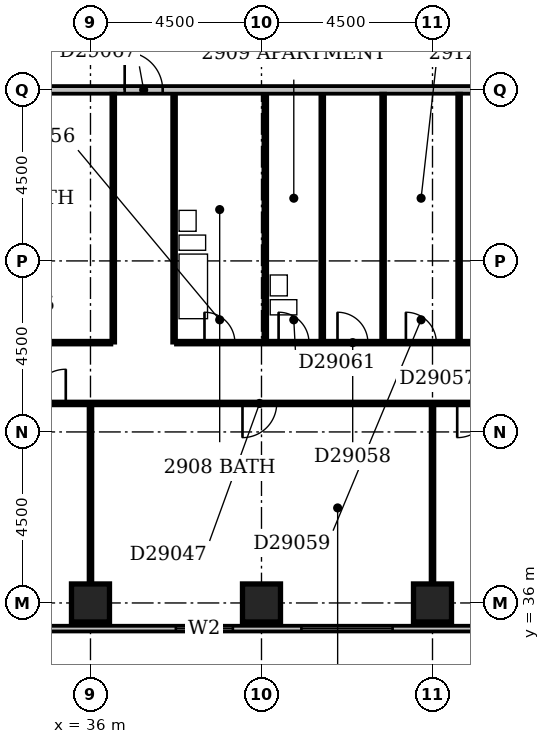
"""IFC4 building model, lengths in metres.
Left out: names, types, materials, properties, quantities, classifications, styles, units other than length and angle.
Written with IfcOpenShell. Run it as: python <this file> out.ifc"""

import sys

from ifc_helpers import new_model, si_unit, direction, frame, frame_2d, origin, origin_2d, place, context, subcontext, project, spatial, rectangle, extrude, element, fill, save


model = new_model("IFC4")
c1 = context("Model", 3, precision=1e-05, world=origin(), true_north=direction((0.0, 1.0)))
c2 = subcontext(c1, "Body", "Model", "MODEL_VIEW")
j1 = project(units=[si_unit("LENGTHUNIT", "METRE"), si_unit("PLANEANGLEUNIT", "RADIAN")], contexts=[c1])
p1 = place(None, origin())
s1 = spatial("IfcSite", under=j1, at=p1, CompositionType="ELEMENT")
p2 = place(p1, origin())
s2 = spatial("IfcBuilding", under=s1, at=p2, CompositionType="ELEMENT")
p3 = place(p2, frame((0.0, 0.0, 119.6)))
s3 = spatial("IfcBuildingStorey", under=s2, at=p3, CompositionType="ELEMENT", Elevation=119.6)
for number, where, z_axis, x_axis in (
    (1, (36.0, 36.0, -0.3), (0.0, 0.0, 1.0), (1.0, 0.0, 0.0)),
    (2, (40.5, 36.0, -0.3), (0.0, 0.0, 1.0), (1.0, 0.0, 0.0)),
    (3, (45.0, 36.0, -0.3), (0.0, 0.0, 1.0), (1.0, 0.0, 0.0)),
):
    element("IfcColumn", number, at=place(p3, frame(where, z_axis=z_axis, x_axis=x_axis)), inside=s3, PredefinedType="COLUMN", context=c2, shape_type="SweptSolid", body=[
        extrude(rectangle(XDim=1.0, YDim=1.0, at=origin_2d()), origin(), (0.0, 0.0, 1.0), 3.6),
    ])
p4 = place(p3, frame((23.1, 35.325, 0.0), z_axis=(0.0, 0.0, 1.0), x_axis=(1.0, 0.0, 0.0)))
e4 = element("IfcWall", 4, at=p4, inside=s3, PredefinedType="STANDARD", context=c2, shape_type="SweptSolid", body=[
    extrude(rectangle(XDim=45.15, YDim=0.15, at=frame_2d((22.575, 0.0))), origin(), (0.0, 0.0, 1.0), 2.7),
])
p5 = place(p4, frame((0.45, 0.0, 0.6)))
e5 = element("IfcOpeningElement", 5, at=p5, cuts=e4, PredefinedType="OPENING", context=c2, shape_type="SweptSolid", body=[
    extrude(rectangle(XDim=2.4, YDim=1.8, at=frame_2d((1.2, 0.9))), frame((0.0, 0.087, 0.0), z_axis=(0.0, -1.0, 0.0), x_axis=(1.0, 0.0, 0.0)), (0.0, 0.0, 1.0), 0.174),
])
p6 = place(p4, frame((4.95, 0.0, 0.6)))
e6 = element("IfcOpeningElement", 6, at=p6, cuts=e4, PredefinedType="OPENING", context=c2, shape_type="SweptSolid", body=[
    extrude(rectangle(XDim=2.4, YDim=1.8, at=frame_2d((1.2, 0.9))), frame((0.0, 0.087, 0.0), z_axis=(0.0, -1.0, 0.0), x_axis=(1.0, 0.0, 0.0)), (0.0, 0.0, 1.0), 0.174),
])
p7 = place(p4, frame((9.225, 0.0, 0.6)))
e7 = element("IfcOpeningElement", 7, at=p7, cuts=e4, PredefinedType="OPENING", context=c2, shape_type="SweptSolid", body=[
    extrude(rectangle(XDim=1.5, YDim=1.8, at=frame_2d((0.75, 0.9))), frame((0.0, 0.087, 0.0), z_axis=(0.0, -1.0, 0.0), x_axis=(1.0, 0.0, 0.0)), (0.0, 0.0, 1.0), 0.174),
])
p8 = place(p4, frame((15.146, 0.0, 0.6)))
e8 = element("IfcOpeningElement", 8, at=p8, cuts=e4, PredefinedType="OPENING", context=c2, shape_type="SweptSolid", body=[
    extrude(rectangle(XDim=1.5, YDim=1.8, at=frame_2d((0.75, 0.9))), frame((0.0, 0.087, 0.0), z_axis=(0.0, -1.0, 0.0), x_axis=(1.0, 0.0, 0.0)), (0.0, 0.0, 1.0), 0.174),
])
p9 = place(p4, frame((18.45, 0.0, 0.6)))
e9 = element("IfcOpeningElement", 9, at=p9, cuts=e4, PredefinedType="OPENING", context=c2, shape_type="SweptSolid", body=[
    extrude(rectangle(XDim=2.4, YDim=1.8, at=frame_2d((1.2, 0.9))), frame((0.0, 0.087, 0.0), z_axis=(0.0, -1.0, 0.0), x_axis=(1.0, 0.0, 0.0)), (0.0, 0.0, 1.0), 0.174),
])
p10 = place(p4, frame((22.95, 0.0, 0.6)))
e10 = element("IfcOpeningElement", 10, at=p10, cuts=e4, PredefinedType="OPENING", context=c2, shape_type="SweptSolid", body=[
    extrude(rectangle(XDim=2.4, YDim=1.8, at=frame_2d((1.2, 0.9))), frame((0.0, 0.087, 0.0), z_axis=(0.0, -1.0, 0.0), x_axis=(1.0, 0.0, 0.0)), (0.0, 0.0, 1.0), 0.174),
])
p11 = place(p4, frame((27.45, 0.0, 0.6)))
e11 = element("IfcOpeningElement", 11, at=p11, cuts=e4, PredefinedType="OPENING", context=c2, shape_type="SweptSolid", body=[
    extrude(rectangle(XDim=2.4, YDim=1.8, at=frame_2d((1.2, 0.9))), frame((0.0, 0.087, 0.0), z_axis=(0.0, -1.0, 0.0), x_axis=(1.0, 0.0, 0.0)), (0.0, 0.0, 1.0), 0.174),
])
p12 = place(p4, frame((31.95, 0.0, 0.6)))
e12 = element("IfcOpeningElement", 12, at=p12, cuts=e4, PredefinedType="OPENING", context=c2, shape_type="SweptSolid", body=[
    extrude(rectangle(XDim=2.4, YDim=1.8, at=frame_2d((1.2, 0.9))), frame((0.0, 0.087, 0.0), z_axis=(0.0, -1.0, 0.0), x_axis=(1.0, 0.0, 0.0)), (0.0, 0.0, 1.0), 0.174),
])
p13 = place(p4, frame((36.45, 0.0, 0.6)))
e13 = element("IfcOpeningElement", 13, at=p13, cuts=e4, PredefinedType="OPENING", context=c2, shape_type="SweptSolid", body=[
    extrude(rectangle(XDim=2.4, YDim=1.8, at=frame_2d((1.2, 0.9))), frame((0.0, 0.087, 0.0), z_axis=(0.0, -1.0, 0.0), x_axis=(1.0, 0.0, 0.0)), (0.0, 0.0, 1.0), 0.174),
])
p14 = place(p4, frame((40.631, 0.0, 0.6)))
e14 = element("IfcOpeningElement", 14, at=p14, cuts=e4, PredefinedType="OPENING", context=c2, shape_type="SweptSolid", body=[
    extrude(rectangle(XDim=0.9, YDim=1.8, at=frame_2d((0.45, 0.9))), frame((0.0, 0.087, 0.0), z_axis=(0.0, -1.0, 0.0), x_axis=(1.0, 0.0, 0.0)), (0.0, 0.0, 1.0), 0.174),
])
p15 = place(p3, frame((36.0, 36.5, 0.0), z_axis=(0.0, 0.0, 1.0), x_axis=(0.0, 1.0, 0.0)))
e15 = element("IfcWall", 15, at=p15, inside=s3, PredefinedType="PARTITIONING", context=c2, shape_type="SweptSolid", body=[
    extrude(rectangle(XDim=4.7, YDim=0.1, at=frame_2d((2.35, 0.0))), origin(), (0.0, 0.0, 1.0), 2.4),
])
p16 = place(p3, frame((45.0, 36.5, 0.0), z_axis=(0.0, 0.0, 1.0), x_axis=(0.0, 1.0, 0.0)))
e16 = element("IfcWall", 16, at=p16, inside=s3, PredefinedType="PARTITIONING", context=c2, shape_type="SweptSolid", body=[
    extrude(rectangle(XDim=4.7, YDim=0.1, at=frame_2d((2.35, 0.0))), origin(), (0.0, 0.0, 1.0), 2.6),
])
p17 = place(p3, frame((31.6, 41.25, 0.0), z_axis=(0.0, 0.0, 1.0), x_axis=(1.0, 0.0, 0.0)))
e17 = element("IfcWall", 17, at=p17, inside=s3, PredefinedType="PARTITIONING", context=c2, shape_type="SweptSolid", body=[
    extrude(rectangle(XDim=17.8, YDim=0.1, at=frame_2d((8.9, 0.0))), origin(), (0.0, 0.0, 1.0), 3.3),
])
p18 = place(p17, frame((2.85, 0.0, 0.0)))
e18 = element("IfcOpeningElement", 18, at=p18, cuts=e17, PredefinedType="OPENING", context=c2, shape_type="SweptSolid", body=[
    extrude(rectangle(XDim=0.9, YDim=2.1, at=frame_2d((0.45, 1.05))), frame((0.0, 0.062, 0.0), z_axis=(0.0, -1.0, 0.0), x_axis=(1.0, 0.0, 0.0)), (0.0, 0.0, 1.0), 0.124),
])
p19 = place(p17, frame((8.4, 0.0, 0.0)))
e19 = element("IfcOpeningElement", 19, at=p19, cuts=e17, PredefinedType="OPENING", context=c2, shape_type="SweptSolid", body=[
    extrude(rectangle(XDim=0.9, YDim=2.1, at=frame_2d((0.45, 1.05))), frame((0.0, 0.062, 0.0), z_axis=(0.0, -1.0, 0.0), x_axis=(1.0, 0.0, 0.0)), (0.0, 0.0, 1.0), 0.124),
])
p20 = place(p17, frame((14.05, 0.0, 0.0)))
e20 = element("IfcOpeningElement", 20, at=p20, cuts=e17, PredefinedType="OPENING", context=c2, shape_type="SweptSolid", body=[
    extrude(rectangle(XDim=0.9, YDim=2.1, at=frame_2d((0.45, 1.05))), frame((0.0, 0.062, 0.0), z_axis=(0.0, -1.0, 0.0), x_axis=(1.0, 0.0, 0.0)), (0.0, 0.0, 1.0), 0.124),
])
p21 = place(p3, frame((31.6, 42.85, 0.0), z_axis=(0.0, 0.0, 1.0), x_axis=(1.0, 0.0, 0.0)))
e21 = element("IfcWall", 21, at=p21, inside=s3, PredefinedType="PARTITIONING", context=c2, shape_type="SweptSolid", body=[
    extrude(rectangle(XDim=4.95, YDim=0.1, at=frame_2d((2.475, 0.0))), origin(), (0.0, 0.0, 1.0), 3.3),
])
p22 = place(p21, frame((2.0, 0.0, 0.0)))
e22 = element("IfcOpeningElement", 22, at=p22, cuts=e21, PredefinedType="OPENING", context=c2, shape_type="SweptSolid", body=[
    extrude(rectangle(XDim=0.9, YDim=2.1, at=frame_2d((0.45, 1.05))), frame((0.0, 0.062, 0.0), z_axis=(0.0, -1.0, 0.0), x_axis=(1.0, 0.0, 0.0)), (0.0, 0.0, 1.0), 0.124),
])
p23 = place(p3, frame((36.6, 42.85, 0.0), z_axis=(0.0, 0.0, 1.0), x_axis=(0.0, 1.0, 0.0)))
e23 = element("IfcWall", 23, at=p23, inside=s3, PredefinedType="PARTITIONING", context=c2, shape_type="SweptSolid", body=[
    extrude(rectangle(XDim=6.55, YDim=0.1, at=frame_2d((3.275, 0.0))), origin(), (0.0, 0.0, 1.0), 2.4),
])
p24 = place(p3, frame((38.2, 42.85, 0.0), z_axis=(0.0, 0.0, 1.0), x_axis=(0.0, 1.0, 0.0)))
e24 = element("IfcWall", 24, at=p24, inside=s3, PredefinedType="PLUMBINGWALL", context=c2, shape_type="SweptSolid", body=[
    extrude(rectangle(XDim=6.55, YDim=0.1, at=frame_2d((3.275, 0.0))), origin(), (0.0, 0.0, 1.0), 3.3),
])
p25 = place(p3, frame((38.25, 42.85, 0.0), z_axis=(0.0, 0.0, 1.0), x_axis=(1.0, 0.0, 0.0)))
e25 = element("IfcWall", 25, at=p25, inside=s3, PredefinedType="PARTITIONING", context=c2, shape_type="SweptSolid", body=[
    extrude(rectangle(XDim=11.15, YDim=0.1, at=frame_2d((5.575, 0.0))), origin(), (0.0, 0.0, 1.0), 3.3),
])
p26 = place(p25, frame((0.75, 0.0, 0.0)))
e26 = element("IfcOpeningElement", 26, at=p26, cuts=e25, PredefinedType="OPENING", context=c2, shape_type="SweptSolid", body=[
    extrude(rectangle(XDim=0.8, YDim=2.1, at=frame_2d((0.4, 1.05))), frame((0.0, 0.062, 0.0), z_axis=(0.0, -1.0, 0.0), x_axis=(1.0, 0.0, 0.0)), (0.0, 0.0, 1.0), 0.124),
])
p27 = place(p25, frame((8.05, 0.0, 0.0)))
e27 = element("IfcOpeningElement", 27, at=p27, cuts=e25, PredefinedType="OPENING", context=c2, shape_type="SweptSolid", body=[
    extrude(rectangle(XDim=0.8, YDim=2.1, at=frame_2d((0.4, 1.05))), frame((0.0, 0.062, 0.0), z_axis=(0.0, -1.0, 0.0), x_axis=(1.0, 0.0, 0.0)), (0.0, 0.0, 1.0), 0.124),
])
p28 = place(p25, frame((4.25, 0.0, 0.0)))
e28 = element("IfcOpeningElement", 28, at=p28, cuts=e25, PredefinedType="OPENING", context=c2, shape_type="SweptSolid", body=[
    extrude(rectangle(XDim=0.8, YDim=2.1, at=frame_2d((0.4, 1.05))), frame((0.0, 0.062, 0.0), z_axis=(0.0, -1.0, 0.0), x_axis=(1.0, 0.0, 0.0)), (0.0, 0.0, 1.0), 0.124),
])
p29 = place(p25, frame((6.05, 0.0, 0.0)))
e29 = element("IfcOpeningElement", 29, at=p29, cuts=e25, PredefinedType="OPENING", context=c2, shape_type="SweptSolid", body=[
    extrude(rectangle(XDim=0.8, YDim=2.1, at=frame_2d((0.4, 1.05))), frame((0.0, 0.062, 0.0), z_axis=(0.0, -1.0, 0.0), x_axis=(1.0, 0.0, 0.0)), (0.0, 0.0, 1.0), 0.124),
])
p30 = place(p25, frame((9.95, 0.0, 0.0)))
e30 = element("IfcOpeningElement", 30, at=p30, cuts=e25, PredefinedType="OPENING", context=c2, shape_type="SweptSolid", body=[
    extrude(rectangle(XDim=0.8, YDim=2.1, at=frame_2d((0.4, 1.05))), frame((0.0, 0.062, 0.0), z_axis=(0.0, -1.0, 0.0), x_axis=(1.0, 0.0, 0.0)), (0.0, 0.0, 1.0), 0.124),
])
p31 = place(p25, frame((2.7, 0.0, 0.0)))
e31 = element("IfcOpeningElement", 31, at=p31, cuts=e25, PredefinedType="OPENING", context=c2, shape_type="SweptSolid", body=[
    extrude(rectangle(XDim=0.8, YDim=2.1, at=frame_2d((0.4, 1.05))), frame((0.0, 0.062, 0.0), z_axis=(0.0, -1.0, 0.0), x_axis=(1.0, 0.0, 0.0)), (0.0, 0.0, 1.0), 0.124),
])
for number, where, z_axis, x_axis in (
    (32, (40.6, 42.9, 0.0), (0.0, 0.0, 1.0), (0.0, 1.0, 0.0)),
    (33, (42.1, 42.9, 0.0), (0.0, 0.0, 1.0), (0.0, 1.0, 0.0)),
):
    element("IfcWall", number, at=place(p3, frame(where, z_axis=z_axis, x_axis=x_axis)), inside=s3, PredefinedType="PLUMBINGWALL", context=c2, shape_type="SweptSolid", body=[
        extrude(rectangle(XDim=6.5, YDim=0.1, at=frame_2d((3.25, 0.0))), origin(), (0.0, 0.0, 1.0), 3.3),
    ])
p32 = place(p3, frame((43.7, 42.9, 0.0), z_axis=(0.0, 0.0, 1.0), x_axis=(0.0, 1.0, 0.0)))
e34 = element("IfcWall", 34, at=p32, inside=s3, PredefinedType="PARTITIONING", context=c2, shape_type="SweptSolid", body=[
    extrude(rectangle(XDim=6.5, YDim=0.1, at=frame_2d((3.25, 0.0))), origin(), (0.0, 0.0, 1.0), 3.3),
])
p33 = place(p3, frame((45.7, 42.9, 0.0), z_axis=(0.0, 0.0, 1.0), x_axis=(0.0, 1.0, 0.0)))
e35 = element("IfcWall", 35, at=p33, inside=s3, PredefinedType="PARTITIONING", context=c2, shape_type="SweptSolid", body=[
    extrude(rectangle(XDim=6.5, YDim=0.1, at=frame_2d((3.25, 0.0))), origin(), (0.0, 0.0, 1.0), 2.6),
])
p34 = place(p3, frame((9.1, 49.5, 0.0), z_axis=(0.0, 0.0, 1.0), x_axis=(1.0, 0.0, 0.0)))
e36 = element("IfcWall", 36, at=p34, inside=s3, PredefinedType="PARTITIONING", context=c2, shape_type="SweptSolid", body=[
    extrude(rectangle(XDim=41.55, YDim=0.2, at=frame_2d((20.775, 0.0))), origin(), (0.0, 0.0, 1.0), 3.3),
])
p35 = place(p34, frame((13.7, 0.0, 0.0)))
e37 = element("IfcOpeningElement", 37, at=p35, cuts=e36, PredefinedType="OPENING", context=c2, shape_type="SweptSolid", body=[
    extrude(rectangle(XDim=1.0, YDim=2.1, at=frame_2d((0.5, 1.05))), frame((0.0, 0.112, 0.0), z_axis=(0.0, -1.0, 0.0), x_axis=(1.0, 0.0, 0.0)), (0.0, 0.0, 1.0), 0.224),
])
p36 = place(p34, frame((27.8, 0.0, 0.0)))
e38 = element("IfcOpeningElement", 38, at=p36, cuts=e36, PredefinedType="OPENING", context=c2, shape_type="SweptSolid", body=[
    extrude(rectangle(XDim=1.0, YDim=2.1, at=frame_2d((0.5, 1.05))), frame((0.0, 0.112, 0.0), z_axis=(0.0, -1.0, 0.0), x_axis=(1.0, 0.0, 0.0)), (0.0, 0.0, 1.0), 0.224),
])
p37 = place(p34, frame((8.4, 0.0, 0.0)))
e39 = element("IfcOpeningElement", 39, at=p37, cuts=e36, PredefinedType="OPENING", context=c2, shape_type="SweptSolid", body=[
    extrude(rectangle(XDim=0.9, YDim=2.1, at=frame_2d((0.45, 1.05))), frame((0.0, 0.112, 0.0), z_axis=(0.0, -1.0, 0.0), x_axis=(1.0, 0.0, 0.0)), (0.0, 0.0, 1.0), 0.224),
])
p38 = place(p8, origin())
e40 = element("IfcWindow", 40, at=p38, inside=s3, PartitioningType="SINGLE_PANEL", PredefinedType="WINDOW", context=c2, shape_type="SweptSolid", body=[
    extrude(rectangle(XDim=1.5, YDim=1.8, at=frame_2d((0.75, 0.9))), frame((0.0, 0.03, 0.0), z_axis=(0.0, -1.0, 0.0), x_axis=(1.0, 0.0, 0.0)), (0.0, 0.0, 1.0), 0.06),
])
fill(e8, e40)
p39 = place(p9, origin())
e41 = element("IfcWindow", 41, at=p39, inside=s3, PartitioningType="SINGLE_PANEL", PredefinedType="WINDOW", context=c2, shape_type="SweptSolid", body=[
    extrude(rectangle(XDim=2.4, YDim=1.8, at=frame_2d((1.2, 0.9))), frame((0.0, 0.03, 0.0), z_axis=(0.0, -1.0, 0.0), x_axis=(1.0, 0.0, 0.0)), (0.0, 0.0, 1.0), 0.06),
])
fill(e9, e41)
p40 = place(p18, frame((0.9, 0.0, 0.0), z_axis=(0.0, 0.0, 1.0), x_axis=(-1.0, 0.0, 0.0)))
e42 = element("IfcDoor", 42, at=p40, inside=s3, OperationType="SINGLE_SWING_LEFT", PredefinedType="DOOR", context=c2, shape_type="SweptSolid", body=[
    extrude(rectangle(XDim=0.9, YDim=2.1, at=frame_2d((0.45, 1.05))), frame((0.0, 0.025, 0.0), z_axis=(0.0, -1.0, 0.0), x_axis=(1.0, 0.0, 0.0)), (0.0, 0.0, 1.0), 0.05),
])
fill(e18, e42)
p41 = place(p19, frame((0.9, 0.0, 0.0), z_axis=(0.0, 0.0, 1.0), x_axis=(-1.0, 0.0, 0.0)))
e43 = element("IfcDoor", 43, at=p41, inside=s3, OperationType="SINGLE_SWING_RIGHT", PredefinedType="DOOR", context=c2, shape_type="SweptSolid", body=[
    extrude(rectangle(XDim=0.9, YDim=2.1, at=frame_2d((0.45, 1.05))), frame((0.0, 0.025, 0.0), z_axis=(0.0, -1.0, 0.0), x_axis=(1.0, 0.0, 0.0)), (0.0, 0.0, 1.0), 0.05),
])
fill(e19, e43)
p42 = place(p20, frame((0.9, 0.0, 0.0), z_axis=(0.0, 0.0, 1.0), x_axis=(-1.0, 0.0, 0.0)))
e44 = element("IfcDoor", 44, at=p42, inside=s3, OperationType="SINGLE_SWING_RIGHT", PredefinedType="DOOR", context=c2, shape_type="SweptSolid", body=[
    extrude(rectangle(XDim=0.9, YDim=2.1, at=frame_2d((0.45, 1.05))), frame((0.0, 0.025, 0.0), z_axis=(0.0, -1.0, 0.0), x_axis=(1.0, 0.0, 0.0)), (0.0, 0.0, 1.0), 0.05),
])
fill(e20, e44)
p43 = place(p26, origin())
e45 = element("IfcDoor", 45, at=p43, inside=s3, OperationType="SINGLE_SWING_LEFT", PredefinedType="DOOR", context=c2, shape_type="SweptSolid", body=[
    extrude(rectangle(XDim=0.8, YDim=2.1, at=frame_2d((0.4, 1.05))), frame((0.0, 0.025, 0.0), z_axis=(0.0, -1.0, 0.0), x_axis=(1.0, 0.0, 0.0)), (0.0, 0.0, 1.0), 0.05),
])
fill(e26, e45)
p44 = place(p28, origin())
e46 = element("IfcDoor", 46, at=p44, inside=s3, OperationType="SINGLE_SWING_LEFT", PredefinedType="DOOR", context=c2, shape_type="SweptSolid", body=[
    extrude(rectangle(XDim=0.8, YDim=2.1, at=frame_2d((0.4, 1.05))), frame((0.0, 0.025, 0.0), z_axis=(0.0, -1.0, 0.0), x_axis=(1.0, 0.0, 0.0)), (0.0, 0.0, 1.0), 0.05),
])
fill(e28, e46)
p45 = place(p29, origin())
e47 = element("IfcDoor", 47, at=p45, inside=s3, OperationType="SINGLE_SWING_LEFT", PredefinedType="DOOR", context=c2, shape_type="SweptSolid", body=[
    extrude(rectangle(XDim=0.8, YDim=2.1, at=frame_2d((0.4, 1.05))), frame((0.0, 0.025, 0.0), z_axis=(0.0, -1.0, 0.0), x_axis=(1.0, 0.0, 0.0)), (0.0, 0.0, 1.0), 0.05),
])
fill(e29, e47)
p46 = place(p31, origin())
e48 = element("IfcDoor", 48, at=p46, inside=s3, OperationType="SINGLE_SWING_LEFT", PredefinedType="DOOR", context=c2, shape_type="SweptSolid", body=[
    extrude(rectangle(XDim=0.8, YDim=2.1, at=frame_2d((0.4, 1.05))), frame((0.0, 0.025, 0.0), z_axis=(0.0, -1.0, 0.0), x_axis=(1.0, 0.0, 0.0)), (0.0, 0.0, 1.0), 0.05),
])
fill(e31, e48)
p47 = place(p36, origin())
e49 = element("IfcDoor", 49, at=p47, inside=s3, OperationType="SINGLE_SWING_LEFT", PredefinedType="DOOR", context=c2, shape_type="SweptSolid", body=[
    extrude(rectangle(XDim=1.0, YDim=2.1, at=frame_2d((0.5, 1.05))), frame((0.0, 0.025, 0.0), z_axis=(0.0, -1.0, 0.0), x_axis=(1.0, 0.0, 0.0)), (0.0, 0.0, 1.0), 0.05),
])
fill(e38, e49)
save(model, sys.argv[1])
